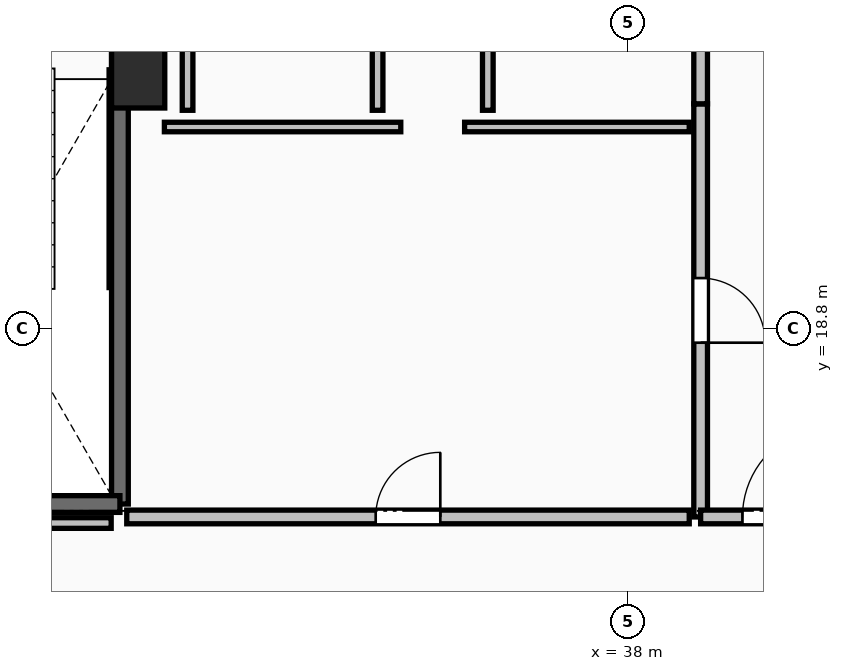
"""IFC4 building model, lengths in metres.
Left out: names, types, materials, properties, quantities, classifications, styles, units other than length and angle.
Written with IfcOpenShell. Run it as: python <this file> out.ifc"""

import sys

from ifc_helpers import new_model, si_unit, direction, frame, frame_2d, origin, origin_2d, place, context, subcontext, project, spatial, rectangle, extrude, element, fill, save


model = new_model("IFC4")
c1 = context("Model", 3, precision=1e-05, world=origin(), true_north=direction((0.0, 1.0)))
c2 = subcontext(c1, "Body", "Model", "MODEL_VIEW")
j1 = project(units=[si_unit("LENGTHUNIT", "METRE"), si_unit("PLANEANGLEUNIT", "RADIAN")], contexts=[c1])
p1 = place(None, origin())
s1 = spatial("IfcSite", under=j1, at=p1, CompositionType="ELEMENT")
p2 = place(p1, origin())
s2 = spatial("IfcBuilding", under=s1, at=p2, CompositionType="ELEMENT")
p3 = place(p2, frame((0.0, 0.0, 269.75)))
s3 = spatial("IfcBuildingStorey", under=s2, at=p3, CompositionType="ELEMENT", Elevation=269.75)
p4 = place(p3, frame((31.55, 22.2, 0.0), z_axis=(0.0, 0.0, 1.0), x_axis=(1.0, 0.0, 0.0)))
e1 = element("IfcColumn", 1, at=p4, inside=s3, PredefinedType="PILASTER", context=c2, shape_type="SweptSolid", body=[
    extrude(rectangle(XDim=0.7, YDim=1.0, at=origin_2d()), origin(), (0.0, 0.0, 1.0), 3.55),
])
p5 = place(p3, frame((31.31, 23.91, 0.0), z_axis=(0.0, 0.0, 1.0), x_axis=(0.0, -1.0, 0.0)))
e2 = element("IfcWall", 2, at=p5, inside=s3, PredefinedType="SOLIDWALL", context=c2, shape_type="SweptSolid", body=[
    extrude(rectangle(XDim=7.42, YDim=0.22, at=frame_2d((3.71, 0.0))), origin(), (0.0, 0.0, 1.0), 3.29),
])
p6 = place(p3, frame((31.31, 16.49, 0.0), z_axis=(0.0, 0.0, 1.0), x_axis=(-1.0, 0.0, 0.0)))
e3 = element("IfcWall", 3, at=p6, inside=s3, PredefinedType="SOLIDWALL", context=c2, shape_type="SweptSolid", body=[
    extrude(rectangle(XDim=3.37, YDim=0.22, at=frame_2d((1.685, 0.0))), origin(), (0.0, 0.0, 1.0), 3.29),
])
p7 = place(p3, frame((38.95, 21.755, 0.0), z_axis=(0.0, 0.0, 1.0), x_axis=(0.0, -1.0, 0.0)))
e4 = element("IfcWall", 4, at=p7, inside=s3, PredefinedType="PARTITIONING", context=c2, shape_type="SweptSolid", body=[
    extrude(rectangle(XDim=5.435, YDim=0.18, at=frame_2d((2.717, 0.0))), origin(), (0.0, 0.0, 1.0), 3.29),
])
p8 = place(p7, frame((2.292, 0.0, 0.0)))
e5 = element("IfcOpeningElement", 5, at=p8, cuts=e4, PredefinedType="OPENING", context=c2, shape_type="SweptSolid", body=[
    extrude(rectangle(XDim=0.85, YDim=2.1, at=frame_2d((0.425, 1.05))), frame((0.0, 0.105, 0.0), z_axis=(0.0, -1.0, 0.0), x_axis=(1.0, 0.0, 0.0)), (0.0, 0.0, 1.0), 0.21),
])
p9 = place(p3, frame((38.95, 24.2, 0.0), z_axis=(0.0, 0.0, 1.0), x_axis=(0.0, -1.0, 0.0)))
e6 = element("IfcWall", 6, at=p9, inside=s3, PredefinedType="PARTITIONING", context=c2, shape_type="SweptSolid", body=[
    extrude(rectangle(XDim=2.445, YDim=0.18, at=frame_2d((1.223, 0.0))), origin(), (0.0, 0.0, 1.0), 2.482),
])
p10 = place(p9, frame((0.722, 0.0, 0.0)))
e7 = element("IfcOpeningElement", 7, at=p10, cuts=e6, PredefinedType="OPENING", context=c2, shape_type="SweptSolid", body=[
    extrude(rectangle(XDim=1.0, YDim=2.15, at=frame_2d((0.5, 1.075))), frame((0.0, 0.105, 0.0), z_axis=(0.0, -1.0, 0.0), x_axis=(1.0, 0.0, 0.0)), (0.0, 0.0, 1.0), 0.21),
])
p11 = place(p3, frame((38.95, 16.32, 0.0), z_axis=(0.0, 0.0, 1.0), x_axis=(1.0, 0.0, 0.0)))
e8 = element("IfcWall", 8, at=p11, inside=s3, PredefinedType="PARTITIONING", context=c2, shape_type="SweptSolid", body=[
    extrude(rectangle(XDim=2.3, YDim=0.18, at=frame_2d((1.15, 0.0))), origin(), (0.0, 0.0, 1.0), 3.29),
])
p12 = place(p11, frame((0.55, 0.0, 0.0)))
e9 = element("IfcOpeningElement", 9, at=p12, cuts=e8, PredefinedType="OPENING", context=c2, shape_type="SweptSolid", body=[
    extrude(rectangle(XDim=1.2, YDim=2.15, at=frame_2d((0.6, 1.075))), frame((0.0, 0.105, 0.0), z_axis=(0.0, -1.0, 0.0), x_axis=(1.0, 0.0, 0.0)), (0.0, 0.0, 1.0), 0.21),
])
p13 = place(p3, frame((35.005, 21.45, 0.0), z_axis=(0.0, 0.0, 1.0), x_axis=(-1.0, 0.0, 0.0)))
e10 = element("IfcWall", 10, at=p13, inside=s3, PredefinedType="PARTITIONING", context=c2, shape_type="SweptSolid", body=[
    extrude(rectangle(XDim=3.11, YDim=0.125, at=frame_2d((1.555, 0.0))), origin(), (0.0, 0.0, 1.0), 3.29),
])
p14 = place(p3, frame((38.8, 21.45, 0.0), z_axis=(0.0, 0.0, 1.0), x_axis=(-1.0, 0.0, 0.0)))
e11 = element("IfcWall", 11, at=p14, inside=s3, PredefinedType="PARTITIONING", context=c2, shape_type="SweptSolid", body=[
    extrude(rectangle(XDim=2.955, YDim=0.125, at=frame_2d((1.478, 0.0))), origin(), (0.0, 0.0, 1.0), 3.29),
])
p15 = place(p3, frame((31.4, 16.32, 0.0), z_axis=(0.0, 0.0, 1.0), x_axis=(1.0, 0.0, 0.0)))
e12 = element("IfcWall", 12, at=p15, inside=s3, PredefinedType="PARTITIONING", context=c2, shape_type="SweptSolid", body=[
    extrude(rectangle(XDim=7.4, YDim=0.18, at=frame_2d((3.7, 0.0))), origin(), (0.0, 0.0, 1.0), 3.29),
])
p16 = place(p15, frame((3.275, 0.0, 0.0)))
e13 = element("IfcOpeningElement", 13, at=p16, cuts=e12, PredefinedType="OPENING", context=c2, shape_type="SweptSolid", body=[
    extrude(rectangle(XDim=0.85, YDim=2.1, at=frame_2d((0.425, 1.05))), frame((0.0, 0.105, 0.0), z_axis=(0.0, -1.0, 0.0), x_axis=(1.0, 0.0, 0.0)), (0.0, 0.0, 1.0), 0.21),
])
for number, where, z_axis, x_axis in (
    (14, (32.2, 24.13, 0.0), (0.0, 0.0, 1.0), (0.0, -1.0, 0.0)),
    (15, (34.7, 21.67, 0.0), (0.0, 0.0, 1.0), (0.0, 1.0, 0.0)),
    (16, (36.15, 24.13, 0.0), (0.0, 0.0, 1.0), (0.0, -1.0, 0.0)),
):
    element("IfcWall", number, at=place(p3, frame(where, z_axis=z_axis, x_axis=x_axis)), inside=s3, PredefinedType="PARTITIONING", context=c2, shape_type="SweptSolid", body=[
        extrude(rectangle(XDim=2.46, YDim=0.14, at=frame_2d((1.23, 0.0))), origin(), (0.0, 0.0, 1.0), 2.482),
    ])
p17 = place(p3, frame((27.45, 16.24, 0.0), z_axis=(0.0, 0.0, 1.0), x_axis=(1.0, 0.0, 0.0)))
e17 = element("IfcWall", 17, at=p17, inside=s3, PredefinedType="PARTITIONING", context=c2, shape_type="SweptSolid", body=[
    extrude(rectangle(XDim=3.745, YDim=0.14, at=frame_2d((1.873, 0.0))), origin(), (0.0, 0.0, 1.0), 2.482),
])
p18 = place(p8, origin())
e18 = element("IfcDoor", 18, at=p18, inside=s3, OperationType="SINGLE_SWING_RIGHT", PredefinedType="DOOR", context=c2, shape_type="SweptSolid", body=[
    extrude(rectangle(XDim=0.85, YDim=2.1, at=frame_2d((0.425, 1.05))), frame((0.0, 0.025, 0.0), z_axis=(0.0, -1.0, 0.0), x_axis=(1.0, 0.0, 0.0)), (0.0, 0.0, 1.0), 0.05),
])
fill(e5, e18)
p19 = place(p12, origin())
e19 = element("IfcDoor", 19, at=p19, inside=s3, OperationType="SINGLE_SWING_RIGHT", PredefinedType="DOOR", context=c2, shape_type="SweptSolid", body=[
    extrude(rectangle(XDim=1.2, YDim=2.15, at=frame_2d((0.6, 1.075))), frame((0.0, 0.025, 0.0), z_axis=(0.0, -1.0, 0.0), x_axis=(1.0, 0.0, 0.0)), (0.0, 0.0, 1.0), 0.05),
])
fill(e9, e19)
p20 = place(p16, origin())
e20 = element("IfcDoor", 20, at=p20, inside=s3, OperationType="SINGLE_SWING_RIGHT", PredefinedType="DOOR", context=c2, shape_type="SweptSolid", body=[
    extrude(rectangle(XDim=0.85, YDim=2.1, at=frame_2d((0.425, 1.05))), frame((0.0, 0.025, 0.0), z_axis=(0.0, -1.0, 0.0), x_axis=(1.0, 0.0, 0.0)), (0.0, 0.0, 1.0), 0.05),
])
fill(e13, e20)
save(model, sys.argv[1])
